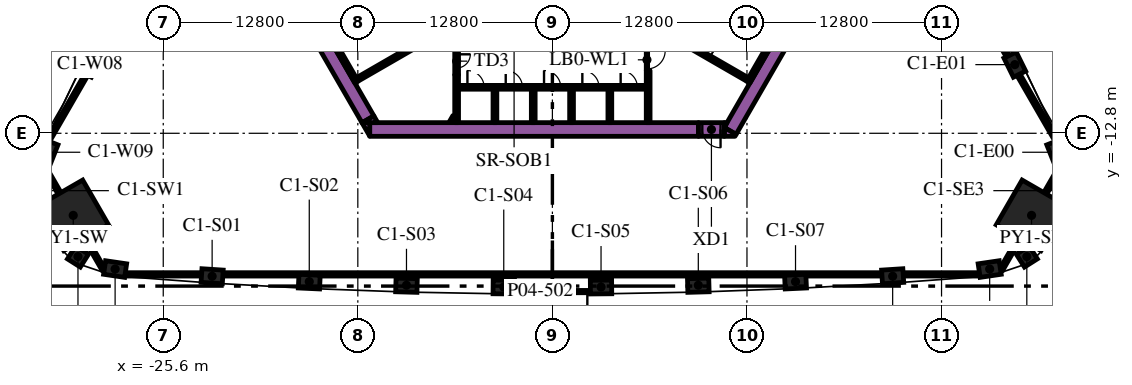
"""IFC4 building model, lengths in metres.
Left out: names, types, materials, properties, quantities, classifications, styles, units other than length and angle.
Written with IfcOpenShell. Run it as: python <this file> out.ifc"""

import sys

from ifc_helpers import new_model, si_unit, direction, frame, frame_2d, origin, origin_2d, place, context, subcontext, project, spatial, polyline, rectangle, outline, extrude, element, fill, save


model = new_model("IFC4")
c1 = context("Model", 3, precision=1e-05, world=origin(), true_north=direction((0.0, 1.0)))
c2 = subcontext(c1, "Body", "Model", "MODEL_VIEW")
j1 = project(units=[si_unit("LENGTHUNIT", "METRE"), si_unit("PLANEANGLEUNIT", "RADIAN")], contexts=[c1])
p1 = place(None, origin())
s1 = spatial("IfcSite", under=j1, at=p1, CompositionType="ELEMENT")
p2 = place(p1, origin())
s2 = spatial("IfcBuilding", under=s1, at=p2, CompositionType="ELEMENT")
p3 = place(p2, frame((0.0, 0.0, 21.6)))
s3 = spatial("IfcBuildingStorey", under=s2, at=p3, CompositionType="ELEMENT", Elevation=21.6)
for number, where, z_axis, x_axis in (
    (1, (31.522, -18.199, 0.0), (0.0, 0.0, 1.0), (0.866, -0.5, 0.0)),
    (2, (-31.522, -18.199, 0.0), (0.0, 0.0, 1.0), (-0.866, -0.5, 0.0)),
):
    element("IfcColumn", number, at=place(p3, frame(where, z_axis=z_axis, x_axis=x_axis)), inside=s3, PredefinedType="COLUMN", context=c2, shape_type="SweptSolid", body=[
        extrude(rectangle(XDim=3.4, YDim=3.4, at=origin_2d()), origin(), (0.0, 0.0, 1.0), 6.0),
    ])
for number, where, z_axis, x_axis in (
    (3, (-28.767, -21.731, 0.0), (0.0, 0.0, 1.0), (0.989, -0.145, 0.0)),
    (4, (-22.385, -22.204, 0.0), (0.0, 0.0, 1.0), (0.998, -0.065, 0.0)),
    (5, (-15.994, -22.558, 0.0), (0.0, 0.0, 1.0), (0.999, -0.046, 0.0)),
    (6, (-9.599, -22.795, 0.0), (0.0, 0.0, 1.0), (1.0, -0.028, 0.0)),
    (7, (-3.2, -22.913, 0.0), (0.0, 0.0, 1.0), (1.0, -0.009, 0.0)),
    (8, (3.2, -22.913, 0.0), (0.0, 0.0, 1.0), (1.0, 0.009, 0.0)),
    (9, (9.599, -22.795, 0.0), (0.0, 0.0, 1.0), (1.0, 0.028, 0.0)),
    (10, (15.994, -22.558, 0.0), (0.0, 0.0, 1.0), (0.999, 0.046, 0.0)),
    (11, (22.385, -22.204, 0.0), (0.0, 0.0, 1.0), (0.998, 0.065, 0.0)),
    (12, (28.767, -21.731, 0.0), (0.0, 0.0, 1.0), (0.989, 0.145, 0.0)),
):
    element("IfcColumn", number, at=place(p3, frame(where, z_axis=z_axis, x_axis=x_axis)), inside=s3, PredefinedType="COLUMN", context=c2, shape_type="SweptSolid", body=[
        extrude(rectangle(XDim=1.4, YDim=0.9, at=origin_2d()), origin(), (0.0, 0.0, 1.0), 6.0),
    ])
p4 = place(p3, frame((31.21, -20.91, 0.0), z_axis=(0.0, 0.0, 1.0), x_axis=(0.844485001826, 0.535579202071, 0.0)))
e13 = element("IfcColumn", 13, at=p4, inside=s3, PredefinedType="COLUMN", context=c2, shape_type="SweptSolid", body=[
    extrude(rectangle(XDim=1.0, YDim=1.0, at=origin_2d()), origin(), (0.0, 0.0, 1.0), 6.0),
])
for number, where, z_axis, x_axis in (
    (14, (33.203, -14.047, 0.0), (0.0, 0.0, 1.0), (-0.369, 0.929, 0.0)),
    (15, (30.421, -8.284, 0.0), (0.0, 0.0, 1.0), (-0.443, 0.897, 0.0)),
    (16, (-30.421, -8.284, 0.0), (0.0, 0.0, 1.0), (-0.443, -0.897, 0.0)),
    (17, (-33.203, -14.047, 0.0), (0.0, 0.0, 1.0), (-0.369, -0.929, 0.0)),
):
    element("IfcColumn", number, at=place(p3, frame(where, z_axis=z_axis, x_axis=x_axis)), inside=s3, PredefinedType="COLUMN", context=c2, shape_type="SweptSolid", body=[
        extrude(rectangle(XDim=1.4, YDim=0.9, at=origin_2d()), origin(), (0.0, 0.0, 1.0), 6.0),
    ])
p5 = place(p3, frame((-31.21, -20.91, 0.0), z_axis=(0.0, 0.0, 1.0), x_axis=(0.844485001826, -0.535579202071, 0.0)))
e18 = element("IfcColumn", 18, at=p5, inside=s3, PredefinedType="COLUMN", context=c2, shape_type="SweptSolid", body=[
    extrude(rectangle(XDim=1.0, YDim=1.0, at=origin_2d()), origin(), (0.0, 0.0, 1.0), 6.0),
])
p6 = place(p3, frame((11.695, -12.644, 0.0), z_axis=(0.0, 0.0, 1.0), x_axis=(0.500010229568, 0.86601949766, 0.0)))
e19 = element("IfcWall", 19, at=p6, inside=s3, PredefinedType="SOLIDWALL", context=c2, shape_type="SweptSolid", body=[
    extrude(rectangle(XDim=9.326, YDim=0.9, at=frame_2d((4.663, 0.0))), origin(), (0.0, 0.0, 1.0), 6.0),
])
p7 = place(p3, origin())
e20 = element("IfcWall", 20, at=p7, inside=s3, PredefinedType="SOLIDWALL", context=c2, shape_type="SweptSolid", body=[
    extrude(outline(polyline([(12.009, -13.0), (11.312, -13.0), (11.312, -12.425), (12.083, -12.871), (12.009, -13.0)])), origin(), (0.0, 0.0, 1.0), 6.0),
])
e21 = element("IfcWall", 21, at=p7, inside=s3, PredefinedType="SOLIDWALL", context=c2, shape_type="SweptSolid", body=[
    extrude(outline(polyline([(11.489, -12.1), (11.312, -12.407), (11.312, -12.1), (11.489, -12.1)])), origin(), (0.0, 0.0, 1.0), 6.0),
])
p8 = place(p3, frame((-12.019, -12.55, 0.0), z_axis=(0.0, 0.0, 1.0), x_axis=(1.0, 0.0, 0.0)))
e22 = element("IfcWall", 22, at=p8, inside=s3, PredefinedType="SOLIDWALL", context=c2, shape_type="SweptSolid", body=[
    extrude(rectangle(XDim=21.63, YDim=0.9, at=frame_2d((10.815, 0.0))), origin(), (0.0, 0.0, 1.0), 6.0),
])
e23 = element("IfcWall", 23, at=p7, inside=s3, PredefinedType="SOLIDWALL", context=c2, shape_type="SweptSolid", body=[
    extrude(outline(polyline([(-12.529, -12.1), (-12.021, -12.1), (-12.021, -12.98), (-12.529, -12.1)])), origin(), (0.0, 0.0, 1.0), 6.0),
])
p9 = place(p3, frame((-12.134, -11.883, 0.0), z_axis=(0.0, 0.0, 1.0), x_axis=(-0.500005339912, 0.866022320763, 0.0)))
e24 = element("IfcWall", 24, at=p9, inside=s3, PredefinedType="SOLIDWALL", context=c2, shape_type="SweptSolid", body=[
    extrude(rectangle(XDim=9.488, YDim=0.9, at=frame_2d((4.744, 0.0))), origin(), (0.0, 0.0, 1.0), 6.0),
])
e25 = element("IfcWall", 25, at=p7, inside=s3, PredefinedType="SOLIDWALL", context=c2, shape_type="SweptSolid", body=[
    extrude(outline(polyline([(-11.489, -12.1), (-12.505, -12.1), (-11.743, -11.66), (-11.489, -12.1)])), origin(), (0.0, 0.0, 1.0), 6.0),
])
p10 = place(p3, frame((12.885, -9.431, 0.0), z_axis=(0.0, 0.0, 1.0), x_axis=(0.500020560727, 0.866013532718, 0.0)))
e26 = element("IfcWall", 26, at=p10, inside=s3, PredefinedType="SOLIDWALL", context=c2, shape_type="SweptSolid", body=[
    extrude(rectangle(XDim=3.45, YDim=0.25, at=frame_2d((1.725, 0.0))), origin(), (0.0, 0.0, 1.0), 6.0),
])
p11 = place(p3, frame((12.84, -9.261, 0.0), z_axis=(0.0, 0.0, 1.0), x_axis=(-0.866013990052, 0.500019768644, 0.0)))
e27 = element("IfcWall", 27, at=p11, inside=s3, PredefinedType="SOLIDWALL", context=c2, shape_type="SweptSolid", body=[
    extrude(rectangle(XDim=6.8, YDim=0.25, at=frame_2d((3.4, 0.0))), origin(), (0.0, 0.0, 1.0), 6.0),
])
p12 = place(p3, frame((-12.885, -9.431, 0.0), z_axis=(0.0, 0.0, 1.0), x_axis=(-0.500020560727, 0.866013532718, 0.0)))
e28 = element("IfcWall", 28, at=p12, inside=s3, PredefinedType="SOLIDWALL", context=c2, shape_type="SweptSolid", body=[
    extrude(rectangle(XDim=3.45, YDim=0.25, at=frame_2d((1.725, 0.0))), origin(), (0.0, 0.0, 1.0), 6.0),
])
p13 = place(p3, frame((-12.84, -9.261, 0.0), z_axis=(0.0, 0.0, 1.0), x_axis=(0.866016039709, 0.500016218704, 0.0)))
e29 = element("IfcWall", 29, at=p13, inside=s3, PredefinedType="SOLIDWALL", context=c2, shape_type="SweptSolid", body=[
    extrude(rectangle(XDim=7.05, YDim=0.25, at=frame_2d((3.525, 0.0))), origin(), (0.0, 0.0, 1.0), 6.0),
])
p14 = place(p3, frame((-3.78, -12.1, 0.0), z_axis=(0.0, 0.0, 1.0), x_axis=(0.0, 1.0, 0.0)))
e30 = element("IfcWall", 30, at=p14, inside=s3, PredefinedType="SOLIDWALL", context=c2, shape_type="SweptSolid", body=[
    extrude(rectangle(XDim=2.2, YDim=0.25, at=frame_2d((1.1, 0.0))), origin(), (0.0, 0.0, 1.0), 6.0),
])
p15 = place(p3, frame((-6.3, -12.1, 0.0), z_axis=(0.0, 0.0, 1.0), x_axis=(0.0, 1.0, 0.0)))
e31 = element("IfcWall", 31, at=p15, inside=s3, PredefinedType="SOLIDWALL", context=c2, shape_type="SweptSolid", body=[
    extrude(rectangle(XDim=3.146, YDim=0.25, at=frame_2d((1.573, 0.0))), origin(), (0.0, 0.0, 1.0), 6.0),
])
p16 = place(p3, frame((6.3, -8.67, 0.0), z_axis=(0.0, 0.0, 1.0), x_axis=(0.0, -1.0, 0.0)))
e32 = element("IfcWall", 32, at=p16, inside=s3, PredefinedType="SOLIDWALL", context=c2, shape_type="SweptSolid", body=[
    extrude(rectangle(XDim=3.43, YDim=0.25, at=frame_2d((1.715, 0.0))), origin(), (0.0, 0.0, 1.0), 6.0),
])
for number, where, z_axis, x_axis in (
    (33, (3.78, -12.1, 0.0), (0.0, 0.0, 1.0), (0.0, 1.0, 0.0)),
    (34, (1.26, -12.1, 0.0), (0.0, 0.0, 1.0), (0.0, 1.0, 0.0)),
    (35, (-1.26, -12.1, 0.0), (0.0, 0.0, 1.0), (0.0, 1.0, 0.0)),
):
    element("IfcWall", number, at=place(p3, frame(where, z_axis=z_axis, x_axis=x_axis)), inside=s3, PredefinedType="SOLIDWALL", context=c2, shape_type="SweptSolid", body=[
        extrude(rectangle(XDim=2.2, YDim=0.25, at=frame_2d((1.1, 0.0))), origin(), (0.0, 0.0, 1.0), 6.0),
    ])
p17 = place(p3, frame((-6.708, -12.068, 0.0), z_axis=(0.0, 0.0, 1.0), x_axis=(0.500000789788, 0.8660249478, 0.0)))
e36 = element("IfcWall", 36, at=p17, inside=s3, PredefinedType="PARTITIONING", context=c2, shape_type="SweptSolid", body=[
    extrude(rectangle(XDim=0.456, YDim=0.15, at=frame_2d((0.228, 0.0))), origin(), (0.0, 0.0, 1.0), 4.85),
])
p18 = place(p3, frame((-6.534, -12.068, 0.0), z_axis=(0.0, 0.0, 1.0), x_axis=(0.500240224089, 0.865886665912, 0.0)))
e37 = element("IfcWall", 37, at=p18, inside=s3, PredefinedType="PARTITIONING", context=c2, shape_type="SweptSolid", body=[
    extrude(rectangle(XDim=0.109, YDim=0.15, at=frame_2d((0.054, 0.0))), origin(), (0.0, 0.0, 1.0), 4.85),
])
p19 = place(p3, frame((-6.175, -9.775, 0.0), z_axis=(0.0, 0.0, 1.0), x_axis=(1.0, 0.0, 0.0)))
e38 = element("IfcWall", 38, at=p19, inside=s3, PredefinedType="SOLIDWALL", context=c2, shape_type="SweptSolid", body=[
    extrude(rectangle(XDim=12.35, YDim=0.25, at=frame_2d((6.175, 0.0))), origin(), (0.0, 0.0, 1.0), 6.0),
])
p20 = place(p19, frame((0.585, 0.0, 0.0)))
e39 = element("IfcOpeningElement", 39, at=p20, cuts=e38, PredefinedType="OPENING", context=c2, shape_type="SweptSolid", body=[
    extrude(rectangle(XDim=1.1, YDim=2.1, at=frame_2d((0.55, 1.05))), frame((0.0, 0.135, 0.0), z_axis=(0.0, -1.0, 0.0), x_axis=(1.0, 0.0, 0.0)), (0.0, 0.0, 1.0), 0.27),
])
p21 = place(p19, frame((3.105, 0.0, 0.0)))
e40 = element("IfcOpeningElement", 40, at=p21, cuts=e38, PredefinedType="OPENING", context=c2, shape_type="SweptSolid", body=[
    extrude(rectangle(XDim=1.1, YDim=2.1, at=frame_2d((0.55, 1.05))), frame((0.0, 0.135, 0.0), z_axis=(0.0, -1.0, 0.0), x_axis=(1.0, 0.0, 0.0)), (0.0, 0.0, 1.0), 0.27),
])
p22 = place(p19, frame((5.625, 0.0, 0.0)))
e41 = element("IfcOpeningElement", 41, at=p22, cuts=e38, PredefinedType="OPENING", context=c2, shape_type="SweptSolid", body=[
    extrude(rectangle(XDim=1.1, YDim=2.1, at=frame_2d((0.55, 1.05))), frame((0.0, 0.135, 0.0), z_axis=(0.0, -1.0, 0.0), x_axis=(1.0, 0.0, 0.0)), (0.0, 0.0, 1.0), 0.27),
])
p23 = place(p19, frame((8.145, 0.0, 0.0)))
e42 = element("IfcOpeningElement", 42, at=p23, cuts=e38, PredefinedType="OPENING", context=c2, shape_type="SweptSolid", body=[
    extrude(rectangle(XDim=1.1, YDim=2.1, at=frame_2d((0.55, 1.05))), frame((0.0, 0.135, 0.0), z_axis=(0.0, -1.0, 0.0), x_axis=(1.0, 0.0, 0.0)), (0.0, 0.0, 1.0), 0.27),
])
p24 = place(p19, frame((10.665, 0.0, 0.0)))
e43 = element("IfcOpeningElement", 43, at=p24, cuts=e38, PredefinedType="OPENING", context=c2, shape_type="SweptSolid", body=[
    extrude(rectangle(XDim=1.1, YDim=2.1, at=frame_2d((0.55, 1.05))), frame((0.0, 0.135, 0.0), z_axis=(0.0, -1.0, 0.0), x_axis=(1.0, 0.0, 0.0)), (0.0, 0.0, 1.0), 0.27),
])
p25 = place(p3, frame((-6.3, -7.154, 0.0), z_axis=(0.0, 0.0, 1.0), x_axis=(0.0, -1.0, 0.0)))
e44 = element("IfcWall", 44, at=p25, inside=s3, PredefinedType="SOLIDWALL", context=c2, shape_type="SweptSolid", body=[
    extrude(rectangle(XDim=1.8, YDim=0.25, at=frame_2d((0.9, 0.0))), origin(), (0.0, 0.0, 1.0), 6.0),
])
p26 = place(p25, frame((0.45, 0.0, 0.0)))
e45 = element("IfcOpeningElement", 45, at=p26, cuts=e44, PredefinedType="OPENING", context=c2, shape_type="SweptSolid", body=[
    extrude(rectangle(XDim=0.9, YDim=2.1, at=frame_2d((0.45, 1.05))), frame((0.0, 0.135, 0.0), z_axis=(0.0, -1.0, 0.0), x_axis=(1.0, 0.0, 0.0)), (0.0, 0.0, 1.0), 0.27),
])
p27 = place(p3, frame((6.22, -7.266, 0.0), z_axis=(0.0, 0.0, 1.0), x_axis=(0.0, -1.0, 0.0)))
e46 = element("IfcWall", 46, at=p27, inside=s3, PredefinedType="PARTITIONING", context=c2, shape_type="SweptSolid", body=[
    extrude(rectangle(XDim=1.4, YDim=0.09, at=frame_2d((0.7, 0.0))), origin(), (0.0, 0.0, 1.0), 4.85),
])
p28 = place(p27, frame((0.1, 0.0, 0.0)))
e47 = element("IfcOpeningElement", 47, at=p28, cuts=e46, PredefinedType="OPENING", context=c2, shape_type="SweptSolid", body=[
    extrude(rectangle(XDim=1.2, YDim=2.1, at=frame_2d((0.6, 1.05))), frame((0.0, 0.055, 0.0), z_axis=(0.0, -1.0, 0.0), x_axis=(1.0, 0.0, 0.0)), (0.0, 0.0, 1.0), 0.11),
])
p29 = place(p3, frame((11.312, -12.55, 0.0), z_axis=(0.0, 0.0, 1.0), x_axis=(-1.0, 0.0, 0.0)))
e48 = element("IfcWall", 48, at=p29, inside=s3, PredefinedType="SOLIDWALL", context=c2, shape_type="SweptSolid", body=[
    extrude(rectangle(XDim=1.7, YDim=0.9, at=frame_2d((0.85, 0.0))), origin(), (0.0, 0.0, 1.0), 6.0),
])
p30 = place(p29, frame((0.25, 0.0, 0.0)))
e49 = element("IfcOpeningElement", 49, at=p30, cuts=e48, PredefinedType="OPENING", context=c2, shape_type="SweptSolid", body=[
    extrude(rectangle(XDim=1.2, YDim=2.1, at=frame_2d((0.6, 1.05))), frame((0.0, 0.46, 0.0), z_axis=(0.0, -1.0, 0.0), x_axis=(1.0, 0.0, 0.0)), (0.0, 0.0, 1.0), 0.92),
])
for number, where, z_axis, x_axis in (
    (50, (38.25, -14.145, 0.0), (0.0, 0.0, 1.0), (-0.5, 0.866, 0.0)),
    (51, (-6.875, 40.198, 0.0), (0.0, 0.0, 1.0), (-0.5, -0.866, 0.0)),
):
    element("IfcWall", number, at=place(p3, frame(where, z_axis=z_axis, x_axis=x_axis)), inside=s3, PredefinedType="SOLIDWALL", context=c2, shape_type="SweptSolid", body=[
        extrude(rectangle(XDim=62.75, YDim=0.25, at=frame_2d((31.375, 0.0))), origin(), (0.0, 0.0, 1.0), 4.5),
    ])
p31 = place(p3, frame((2.499, -23.213, 0.0), z_axis=(0.0, 0.0, 1.0), x_axis=(-1.0, 0.0, 0.0)))
e52 = element("IfcWall", 52, at=p31, inside=s3, PredefinedType="SOLIDWALL", context=c2, shape_type="SweptSolid", body=[
    extrude(rectangle(XDim=4.998, YDim=0.15, at=frame_2d((2.499, 0.0))), origin(), (0.0, 0.0, 1.0), 5.75),
])
p32 = place(p31, frame((0.2, 0.0, 0.0)))
e53 = element("IfcOpeningElement", 53, at=p32, cuts=e52, PredefinedType="OPENING", context=c2, shape_type="SweptSolid", body=[
    extrude(rectangle(XDim=2.0, YDim=2.4, at=frame_2d((1.0, 1.2))), frame((0.0, 0.085, 0.0), z_axis=(0.0, -1.0, 0.0), x_axis=(1.0, 0.0, 0.0)), (0.0, 0.0, 1.0), 0.17),
])
p33 = place(p31, frame((2.3, 0.0, 0.0)))
e54 = element("IfcOpeningElement", 54, at=p33, cuts=e52, PredefinedType="OPENING", context=c2, shape_type="SweptSolid", body=[
    extrude(rectangle(XDim=2.0, YDim=2.4, at=frame_2d((1.0, 1.2))), frame((0.0, 0.085, 0.0), z_axis=(0.0, -1.0, 0.0), x_axis=(1.0, 0.0, 0.0)), (0.0, 0.0, 1.0), 0.17),
])
p34 = place(p20, origin())
e55 = element("IfcDoor", 55, at=p34, inside=s3, OperationType="DOUBLE_DOOR_SLIDING", PredefinedType="DOOR", context=c2, shape_type="SweptSolid", body=[
    extrude(rectangle(XDim=1.1, YDim=2.1, at=frame_2d((0.55, 1.05))), frame((0.0, 0.025, 0.0), z_axis=(0.0, -1.0, 0.0), x_axis=(1.0, 0.0, 0.0)), (0.0, 0.0, 1.0), 0.05),
])
fill(e39, e55)
p35 = place(p21, origin())
e56 = element("IfcDoor", 56, at=p35, inside=s3, OperationType="DOUBLE_DOOR_SLIDING", PredefinedType="DOOR", context=c2, shape_type="SweptSolid", body=[
    extrude(rectangle(XDim=1.1, YDim=2.1, at=frame_2d((0.55, 1.05))), frame((0.0, 0.025, 0.0), z_axis=(0.0, -1.0, 0.0), x_axis=(1.0, 0.0, 0.0)), (0.0, 0.0, 1.0), 0.05),
])
fill(e40, e56)
p36 = place(p22, origin())
e57 = element("IfcDoor", 57, at=p36, inside=s3, OperationType="DOUBLE_DOOR_SLIDING", PredefinedType="DOOR", context=c2, shape_type="SweptSolid", body=[
    extrude(rectangle(XDim=1.1, YDim=2.1, at=frame_2d((0.55, 1.05))), frame((0.0, 0.025, 0.0), z_axis=(0.0, -1.0, 0.0), x_axis=(1.0, 0.0, 0.0)), (0.0, 0.0, 1.0), 0.05),
])
fill(e41, e57)
p37 = place(p23, origin())
e58 = element("IfcDoor", 58, at=p37, inside=s3, OperationType="DOUBLE_DOOR_SLIDING", PredefinedType="DOOR", context=c2, shape_type="SweptSolid", body=[
    extrude(rectangle(XDim=1.1, YDim=2.1, at=frame_2d((0.55, 1.05))), frame((0.0, 0.025, 0.0), z_axis=(0.0, -1.0, 0.0), x_axis=(1.0, 0.0, 0.0)), (0.0, 0.0, 1.0), 0.05),
])
fill(e42, e58)
p38 = place(p24, origin())
e59 = element("IfcDoor", 59, at=p38, inside=s3, OperationType="DOUBLE_DOOR_SLIDING", PredefinedType="DOOR", context=c2, shape_type="SweptSolid", body=[
    extrude(rectangle(XDim=1.1, YDim=2.1, at=frame_2d((0.55, 1.05))), frame((0.0, 0.025, 0.0), z_axis=(0.0, -1.0, 0.0), x_axis=(1.0, 0.0, 0.0)), (0.0, 0.0, 1.0), 0.05),
])
fill(e43, e59)
p39 = place(p26, origin())
e60 = element("IfcDoor", 60, at=p39, inside=s3, OperationType="SINGLE_SWING_LEFT", PredefinedType="DOOR", context=c2, shape_type="SweptSolid", body=[
    extrude(rectangle(XDim=0.9, YDim=2.1, at=frame_2d((0.45, 1.05))), frame((0.0, 0.025, 0.0), z_axis=(0.0, -1.0, 0.0), x_axis=(1.0, 0.0, 0.0)), (0.0, 0.0, 1.0), 0.05),
])
fill(e45, e60)
p40 = place(p28, origin())
e61 = element("IfcDoor", 61, at=p40, inside=s3, OperationType="SINGLE_SWING_LEFT", PredefinedType="DOOR", context=c2, shape_type="SweptSolid", body=[
    extrude(rectangle(XDim=1.2, YDim=2.1, at=frame_2d((0.6, 1.05))), frame((0.0, 0.025, 0.0), z_axis=(0.0, -1.0, 0.0), x_axis=(1.0, 0.0, 0.0)), (0.0, 0.0, 1.0), 0.05),
])
fill(e47, e61)
p41 = place(p30, origin())
e62 = element("IfcDoor", 62, at=p41, inside=s3, OperationType="SINGLE_SWING_LEFT", PredefinedType="DOOR", context=c2, shape_type="SweptSolid", body=[
    extrude(rectangle(XDim=1.2, YDim=2.1, at=frame_2d((0.6, 1.05))), frame((0.0, 0.025, 0.0), z_axis=(0.0, -1.0, 0.0), x_axis=(1.0, 0.0, 0.0)), (0.0, 0.0, 1.0), 0.05),
])
fill(e49, e62)
p42 = place(p32, origin())
e63 = element("IfcDoor", 63, at=p42, inside=s3, OperationType="DOUBLE_DOOR_SINGLE_SWING", PredefinedType="DOOR", context=c2, shape_type="SweptSolid", body=[
    extrude(rectangle(XDim=2.0, YDim=2.4, at=frame_2d((1.0, 1.2))), frame((0.0, 0.025, 0.0), z_axis=(0.0, -1.0, 0.0), x_axis=(1.0, 0.0, 0.0)), (0.0, 0.0, 1.0), 0.05),
])
fill(e53, e63)
p43 = place(p33, origin())
e64 = element("IfcDoor", 64, at=p43, inside=s3, OperationType="DOUBLE_DOOR_SINGLE_SWING", PredefinedType="DOOR", context=c2, shape_type="SweptSolid", body=[
    extrude(rectangle(XDim=2.0, YDim=2.4, at=frame_2d((1.0, 1.2))), frame((0.0, 0.025, 0.0), z_axis=(0.0, -1.0, 0.0), x_axis=(1.0, 0.0, 0.0)), (0.0, 0.0, 1.0), 0.05),
])
fill(e54, e64)
save(model, sys.argv[1])
